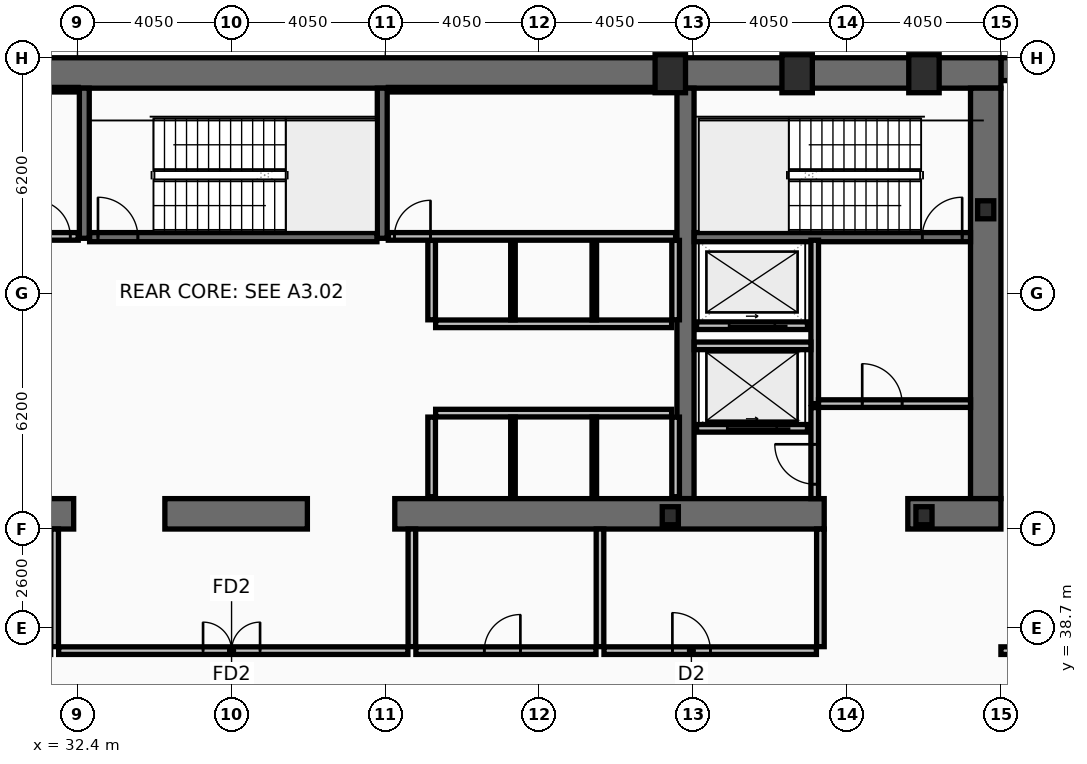
"""IFC4 building model, lengths in metres.
Left out: names, types, materials, properties, quantities, classifications, styles, units other than length and angle.
Written with IfcOpenShell. Run it as: python <this file> out.ifc"""

import sys

from ifc_helpers import new_model, si_unit, direction, frame, frame_2d, origin, origin_2d, place, context, subcontext, project, spatial, rectangle, hollow_rectangle, i_section, extrude, element, fill, save


model = new_model("IFC4")
c1 = context("Model", 3, precision=1e-05, world=origin(), true_north=direction((0.0, 1.0)))
c2 = subcontext(c1, "Body", "Model", "MODEL_VIEW")
j1 = project(units=[si_unit("LENGTHUNIT", "METRE"), si_unit("PLANEANGLEUNIT", "RADIAN")], contexts=[c1])
p1 = place(None, origin())
s1 = spatial("IfcSite", under=j1, at=p1, CompositionType="ELEMENT")
p2 = place(p1, origin())
s2 = spatial("IfcBuilding", under=s1, at=p2, CompositionType="ELEMENT")
p3 = place(p2, frame((0.0, 0.0, -4.5)))
s3 = spatial("IfcBuildingStorey", under=s2, at=p3, CompositionType="ELEMENT", Elevation=-4.5)
p4 = place(p3, frame((56.7, 53.4, 0.0), z_axis=(0.0, 0.0, 1.0), x_axis=(1.0, 0.0, 0.0)))
e1 = element("IfcWall", 1, at=p4, inside=s3, PredefinedType="SOLIDWALL", context=c2, shape_type="SweptSolid", body=[
    extrude(rectangle(XDim=15.6, YDim=0.6, at=frame_2d((7.8, 0.0))), origin(), (0.0, 0.0, 1.0), 4.28),
])
p5 = place(p3, frame((16.2, 53.3, 0.0), z_axis=(0.0, 0.0, 1.0), x_axis=(1.0, 0.0, 0.0)))
e2 = element("IfcWall", 2, at=p5, inside=s3, PredefinedType="SHEAR", context=c2, shape_type="SweptSolid", body=[
    extrude(rectangle(XDim=40.5, YDim=0.8, at=frame_2d((20.25, 0.0))), origin(), (0.0, 0.0, 1.0), 4.28),
])
p6 = place(p3, frame((56.3, 52.9, 0.0), z_axis=(0.0, 0.0, 1.0), x_axis=(0.0, -1.0, 0.0)))
e3 = element("IfcWall", 3, at=p6, inside=s3, PredefinedType="SHEAR", context=c2, shape_type="SweptSolid", body=[
    extrude(rectangle(XDim=10.8, YDim=0.8, at=frame_2d((5.4, 0.0))), origin(), (0.0, 0.0, 1.0), 4.28),
])
p7 = place(p3, frame((48.4, 42.1, 0.0), z_axis=(0.0, 0.0, 1.0), x_axis=(0.0, 1.0, 0.0)))
e4 = element("IfcWall", 4, at=p7, inside=s3, PredefinedType="SHEAR", context=c2, shape_type="SweptSolid", body=[
    extrude(rectangle(XDim=10.8, YDim=0.45, at=frame_2d((5.4, 0.0))), origin(), (0.0, 0.0, 1.0), 4.28),
])
p8 = place(p3, frame((32.3, 41.7, 0.0), z_axis=(0.0, 0.0, 1.0), x_axis=(-1.0, 0.0, 0.0)))
e5 = element("IfcWall", 5, at=p8, inside=s3, PredefinedType="SHEAR", context=c2, shape_type="SweptSolid", body=[
    extrude(rectangle(XDim=11.45, YDim=0.8, at=frame_2d((5.725, 0.0))), origin(), (0.0, 0.0, 1.0), 4.28),
])
p9 = place(p3, frame((38.45, 41.7, 0.0), z_axis=(0.0, 0.0, 1.0), x_axis=(-1.0, 0.0, 0.0)))
e6 = element("IfcWall", 6, at=p9, inside=s3, PredefinedType="SHEAR", context=c2, shape_type="SweptSolid", body=[
    extrude(rectangle(XDim=3.75, YDim=0.8, at=frame_2d((1.875, 0.0))), origin(), (0.0, 0.0, 1.0), 4.28),
])
p10 = place(p3, frame((52.05, 41.7, 0.0), z_axis=(0.0, 0.0, 1.0), x_axis=(-1.0, 0.0, 0.0)))
e7 = element("IfcWall", 7, at=p10, inside=s3, PredefinedType="SHEAR", context=c2, shape_type="SweptSolid", body=[
    extrude(rectangle(XDim=11.3, YDim=0.8, at=frame_2d((5.65, 0.0))), origin(), (0.0, 0.0, 1.0), 4.28),
])
p11 = place(p3, frame((56.7, 41.7, 0.0), z_axis=(0.0, 0.0, 1.0), x_axis=(-1.0, 0.0, 0.0)))
e8 = element("IfcWall", 8, at=p11, inside=s3, PredefinedType="SHEAR", context=c2, shape_type="SweptSolid", body=[
    extrude(rectangle(XDim=2.45, YDim=0.8, at=frame_2d((1.225, 0.0))), origin(), (0.0, 0.0, 1.0), 4.28),
])
for number, where, z_axis, x_axis in (
    (9, (32.58, 48.95, 0.0), (0.0, 0.0, 1.0), (0.0, 1.0, 0.0)),
    (10, (40.42, 48.95, 0.0), (0.0, 0.0, 1.0), (0.0, 1.0, 0.0)),
):
    element("IfcWall", number, at=place(p3, frame(where, z_axis=z_axis, x_axis=x_axis)), inside=s3, PredefinedType="SHEAR", context=c2, shape_type="SweptSolid", body=[
        extrude(rectangle(XDim=3.95, YDim=0.26, at=frame_2d((1.975, 0.0))), origin(), (0.0, 0.0, 1.0), 4.28),
    ])
p12 = place(p3, frame((48.63, 48.98, 0.0), z_axis=(0.0, 0.0, 1.0), x_axis=(1.0, 0.0, 0.0)))
e11 = element("IfcWall", 11, at=p12, inside=s3, PredefinedType="SHEAR", context=c2, shape_type="SweptSolid", body=[
    extrude(rectangle(XDim=7.27, YDim=0.24, at=frame_2d((3.635, 0.0))), origin(), (0.0, 0.0, 1.0), 4.28),
])
p13 = place(p12, frame((6.0, 0.0, 0.0)))
e12 = element("IfcOpeningElement", 12, at=p13, cuts=e11, PredefinedType="OPENING", context=c2, shape_type="SweptSolid", body=[
    extrude(rectangle(XDim=1.05, YDim=2.15, at=frame_2d((0.525, 1.075))), frame((0.0, 0.13, 0.0), z_axis=(0.0, -1.0, 0.0), x_axis=(1.0, 0.0, 0.0)), (0.0, 0.0, 1.0), 0.26),
])
p14 = place(p3, frame((32.72, 48.98, 0.0), z_axis=(0.0, 0.0, 1.0), x_axis=(1.0, 0.0, 0.0)))
e13 = element("IfcWall", 13, at=p14, inside=s3, PredefinedType="SHEAR", context=c2, shape_type="SweptSolid", body=[
    extrude(rectangle(XDim=7.56, YDim=0.24, at=frame_2d((3.78, 0.0))), origin(), (0.0, 0.0, 1.0), 4.28),
])
p15 = place(p14, frame((0.22, 0.0, 0.0)))
e14 = element("IfcOpeningElement", 14, at=p15, cuts=e13, PredefinedType="OPENING", context=c2, shape_type="SweptSolid", body=[
    extrude(rectangle(XDim=1.05, YDim=2.15, at=frame_2d((0.525, 1.075))), frame((0.0, 0.13, 0.0), z_axis=(0.0, -1.0, 0.0), x_axis=(1.0, 0.0, 0.0)), (0.0, 0.0, 1.0), 0.26),
])
for number, where, z_axis, x_axis in (
    (15, (48.0, 53.28, 0.0), (0.0, 0.0, 1.0), (1.0, 0.0, 0.0)),
    (16, (51.337, 53.28, 0.0), (0.0, 0.0, 1.0), (1.0, 0.0, 0.0)),
    (17, (54.675, 53.28, 0.0), (0.0, 0.0, 1.0), (1.0, 0.0, 0.0)),
):
    element("IfcColumn", number, at=place(p3, frame(where, z_axis=z_axis, x_axis=x_axis)), inside=s3, PredefinedType="COLUMN", context=c2, shape_type="SweptSolid", body=[
        extrude(hollow_rectangle(XDim=0.8, YDim=1.0, WallThickness=0.055, at=origin_2d()), origin(), (0.0, 0.0, 1.0), 4.5),
    ])
for number, where, z_axis, x_axis in (
    (18, (56.3, 49.7, 0.0), (0.0, 0.0, 1.0), (1.0, 0.0, 0.0)),
    (19, (48.0, 41.65, 0.0), (0.0, 0.0, 1.0), (1.0, 0.0, 0.0)),
    (20, (54.675, 41.65, 0.0), (0.0, 0.0, 1.0), (1.0, 0.0, 0.0)),
):
    element("IfcColumn", number, at=place(p3, frame(where, z_axis=z_axis, x_axis=x_axis)), inside=s3, PredefinedType="COLUMN", context=c2, shape_type="SweptSolid", body=[
        extrude(i_section(OverallWidth=0.424, OverallDepth=0.474, WebThickness=0.048, FlangeThickness=0.077, at=origin_2d()), origin(), (0.0, 0.0, 1.0), 4.5),
    ])
p16 = place(p3, frame((51.61, 43.95, 0.0), z_axis=(0.0, 0.0, 1.0), x_axis=(-1.0, 0.0, 0.0)))
e21 = element("IfcWall", 21, at=p16, inside=s3, PredefinedType="PARTITIONING", context=c2, shape_type="SweptSolid", body=[
    extrude(rectangle(XDim=2.92, YDim=0.2, at=frame_2d((1.46, 0.0))), origin(), (0.0, 0.0, 1.0), 4.28),
])
p17 = place(p16, frame((0.81, 0.0, 0.0)))
e22 = element("IfcOpeningElement", 22, at=p17, cuts=e21, PredefinedType="OPENING", context=c2, shape_type="SweptSolid", body=[
    extrude(rectangle(XDim=1.3, YDim=2.18, at=frame_2d((0.65, 1.09))), frame((0.0, 0.11, 0.0), z_axis=(0.0, -1.0, 0.0), x_axis=(1.0, 0.0, 0.0)), (0.0, 0.0, 1.0), 0.22),
])
p18 = place(p3, frame((51.61, 46.65, 0.0), z_axis=(0.0, 0.0, 1.0), x_axis=(-1.0, 0.0, 0.0)))
e23 = element("IfcWall", 23, at=p18, inside=s3, PredefinedType="PARTITIONING", context=c2, shape_type="SweptSolid", body=[
    extrude(rectangle(XDim=2.92, YDim=0.2, at=frame_2d((1.46, 0.0))), origin(), (0.0, 0.0, 1.0), 4.28),
])
p19 = place(p18, frame((0.86, 0.0, 0.0)))
e24 = element("IfcOpeningElement", 24, at=p19, cuts=e23, PredefinedType="OPENING", context=c2, shape_type="SweptSolid", body=[
    extrude(rectangle(XDim=1.2, YDim=2.18, at=frame_2d((0.6, 1.09))), frame((0.0, 0.11, 0.0), z_axis=(0.0, -1.0, 0.0), x_axis=(1.0, 0.0, 0.0)), (0.0, 0.0, 1.0), 0.22),
])
p20 = place(p3, frame((51.8, 44.6, 0.0), z_axis=(0.0, 0.0, 1.0), x_axis=(0.0, 1.0, 0.0)))
e25 = element("IfcWall", 25, at=p20, inside=s3, PredefinedType="PARTITIONING", context=c2, shape_type="SweptSolid", body=[
    extrude(rectangle(XDim=4.3, YDim=0.2, at=frame_2d((2.15, 0.0))), origin(), (0.0, 0.0, 1.0), 4.28),
])
p21 = place(p3, frame((51.9, 44.6, 0.0), z_axis=(0.0, 0.0, 1.0), x_axis=(1.0, 0.0, 0.0)))
e26 = element("IfcWall", 26, at=p21, inside=s3, PredefinedType="PARTITIONING", context=c2, shape_type="SweptSolid", body=[
    extrude(rectangle(XDim=4.0, YDim=0.2, at=frame_2d((2.0, 0.0))), origin(), (0.0, 0.0, 1.0), 4.28),
])
p22 = place(p21, frame((1.15, 0.0, 0.0)))
e27 = element("IfcOpeningElement", 27, at=p22, cuts=e26, PredefinedType="OPENING", context=c2, shape_type="SweptSolid", body=[
    extrude(rectangle(XDim=1.05, YDim=2.15, at=frame_2d((0.525, 1.075))), frame((0.0, 0.11, 0.0), z_axis=(0.0, -1.0, 0.0), x_axis=(1.0, 0.0, 0.0)), (0.0, 0.0, 1.0), 0.22),
])
p23 = place(p3, frame((48.63, 46.12, 0.0), z_axis=(0.0, 0.0, 1.0), x_axis=(1.0, 0.0, 0.0)))
e28 = element("IfcWall", 28, at=p23, inside=s3, PredefinedType="PARTITIONING", context=c2, shape_type="SweptSolid", body=[
    extrude(rectangle(XDim=3.07, YDim=0.2, at=frame_2d((1.535, 0.0))), origin(), (0.0, 0.0, 1.0), 4.28),
])
p24 = place(p3, frame((51.8, 42.1, 0.0), z_axis=(0.0, 0.0, 1.0), x_axis=(0.0, 1.0, 0.0)))
e29 = element("IfcWall", 29, at=p24, inside=s3, PredefinedType="PARTITIONING", context=c2, shape_type="SweptSolid", body=[
    extrude(rectangle(XDim=2.395, YDim=0.2, at=frame_2d((1.198, 0.0))), origin(), (0.0, 0.0, 1.0), 4.28),
])
p25 = place(p24, frame((0.38, 0.0, 0.0)))
e30 = element("IfcOpeningElement", 30, at=p25, cuts=e29, PredefinedType="OPENING", context=c2, shape_type="SweptSolid", body=[
    extrude(rectangle(XDim=1.05, YDim=2.15, at=frame_2d((0.525, 1.075))), frame((0.0, 0.11, 0.0), z_axis=(0.0, -1.0, 0.0), x_axis=(1.0, 0.0, 0.0)), (0.0, 0.0, 1.0), 0.22),
])
p26 = place(p3, frame((41.825, 46.7, 0.0), z_axis=(0.0, 0.0, 1.0), x_axis=(1.0, 0.0, 0.0)))
e31 = element("IfcWall", 31, at=p26, inside=s3, PredefinedType="PARTITIONING", context=c2, shape_type="SweptSolid", body=[
    extrude(rectangle(XDim=6.21, YDim=0.2, at=frame_2d((3.105, 0.0))), origin(), (0.0, 0.0, 1.0), 4.28),
])
for number, where, z_axis, x_axis in (
    (32, (41.72, 46.805, 0.0), (0.0, 0.0, 1.0), (0.0, 1.0, 0.0)),
    (33, (48.14, 46.805, 0.0), (0.0, 0.0, 1.0), (0.0, 1.0, 0.0)),
):
    element("IfcWall", number, at=place(p3, frame(where, z_axis=z_axis, x_axis=x_axis)), inside=s3, PredefinedType="PARTITIONING", context=c2, shape_type="SweptSolid", body=[
        extrude(rectangle(XDim=2.09, YDim=0.2, at=frame_2d((1.045, 0.0))), origin(), (0.0, 0.0, 1.0), 4.28),
    ])
for number, where, z_axis, x_axis in (
    (34, (43.86, 46.805, 0.0), (0.0, 0.0, 1.0), (0.0, 1.0, 0.0)),
    (35, (46.0, 46.805, 0.0), (0.0, 0.0, 1.0), (0.0, 1.0, 0.0)),
):
    element("IfcWall", number, at=place(p3, frame(where, z_axis=z_axis, x_axis=x_axis)), inside=s3, PredefinedType="PARTITIONING", context=c2, shape_type="SweptSolid", body=[
        extrude(rectangle(XDim=2.09, YDim=0.12, at=frame_2d((1.045, 0.0))), origin(), (0.0, 0.0, 1.0), 4.28),
    ])
p27 = place(p3, frame((41.825, 44.35, 0.0), z_axis=(0.0, 0.0, 1.0), x_axis=(1.0, 0.0, 0.0)))
e36 = element("IfcWall", 36, at=p27, inside=s3, PredefinedType="PARTITIONING", context=c2, shape_type="SweptSolid", body=[
    extrude(rectangle(XDim=6.21, YDim=0.2, at=frame_2d((3.105, 0.0))), origin(), (0.0, 0.0, 1.0), 4.28),
])
for number, where, z_axis, x_axis in (
    (37, (41.72, 42.15, 0.0), (0.0, 0.0, 1.0), (0.0, 1.0, 0.0)),
    (38, (48.14, 42.15, 0.0), (0.0, 0.0, 1.0), (0.0, 1.0, 0.0)),
):
    element("IfcWall", number, at=place(p3, frame(where, z_axis=z_axis, x_axis=x_axis)), inside=s3, PredefinedType="PARTITIONING", context=c2, shape_type="SweptSolid", body=[
        extrude(rectangle(XDim=2.095, YDim=0.2, at=frame_2d((1.048, 0.0))), origin(), (0.0, 0.0, 1.0), 4.28),
    ])
for number, where, z_axis, x_axis in (
    (39, (43.86, 42.15, 0.0), (0.0, 0.0, 1.0), (0.0, 1.0, 0.0)),
    (40, (46.0, 42.15, 0.0), (0.0, 0.0, 1.0), (0.0, 1.0, 0.0)),
):
    element("IfcWall", number, at=place(p3, frame(where, z_axis=z_axis, x_axis=x_axis)), inside=s3, PredefinedType="PARTITIONING", context=c2, shape_type="SweptSolid", body=[
        extrude(rectangle(XDim=2.095, YDim=0.12, at=frame_2d((1.048, 0.0))), origin(), (0.0, 0.0, 1.0), 4.28),
    ])
p28 = place(p3, frame((24.7, 52.86, 0.0), z_axis=(0.0, 0.0, 1.0), x_axis=(1.0, 0.0, 0.0)))
e41 = element("IfcWall", 41, at=p28, inside=s3, PredefinedType="PARTITIONING", context=c2, shape_type="SweptSolid", body=[
    extrude(rectangle(XDim=7.72, YDim=0.12, at=frame_2d((3.86, 0.0))), origin(), (0.0, 0.0, 1.0), 4.28),
])
p29 = place(p3, frame((24.7, 49.0, 0.0), z_axis=(0.0, 0.0, 1.0), x_axis=(1.0, 0.0, 0.0)))
e42 = element("IfcWall", 42, at=p29, inside=s3, PredefinedType="PARTITIONING", context=c2, shape_type="SweptSolid", body=[
    extrude(rectangle(XDim=7.72, YDim=0.2, at=frame_2d((3.86, 0.0))), origin(), (0.0, 0.0, 1.0), 4.28),
])
p30 = place(p29, frame((6.56, 0.0, 0.0)))
e43 = element("IfcOpeningElement", 43, at=p30, cuts=e42, PredefinedType="OPENING", context=c2, shape_type="SweptSolid", body=[
    extrude(rectangle(XDim=0.95, YDim=2.1, at=frame_2d((0.475, 1.05))), frame((0.0, 0.11, 0.0), z_axis=(0.0, -1.0, 0.0), x_axis=(1.0, 0.0, 0.0)), (0.0, 0.0, 1.0), 0.22),
])
p31 = place(p3, frame((40.58, 52.86, 0.0), z_axis=(0.0, 0.0, 1.0), x_axis=(1.0, 0.0, 0.0)))
e44 = element("IfcWall", 44, at=p31, inside=s3, PredefinedType="PARTITIONING", context=c2, shape_type="SweptSolid", body=[
    extrude(rectangle(XDim=7.56, YDim=0.12, at=frame_2d((3.78, 0.0))), origin(), (0.0, 0.0, 1.0), 4.28),
])
p32 = place(p3, frame((40.58, 49.0, 0.0), z_axis=(0.0, 0.0, 1.0), x_axis=(1.0, 0.0, 0.0)))
e45 = element("IfcWall", 45, at=p32, inside=s3, PredefinedType="PARTITIONING", context=c2, shape_type="SweptSolid", body=[
    extrude(rectangle(XDim=7.56, YDim=0.2, at=frame_2d((3.78, 0.0))), origin(), (0.0, 0.0, 1.0), 4.28),
])
p33 = place(p32, frame((0.16, 0.0, 0.0)))
e46 = element("IfcOpeningElement", 46, at=p33, cuts=e45, PredefinedType="OPENING", context=c2, shape_type="SweptSolid", body=[
    extrude(rectangle(XDim=0.95, YDim=2.1, at=frame_2d((0.475, 1.05))), frame((0.0, 0.11, 0.0), z_axis=(0.0, -1.0, 0.0), x_axis=(1.0, 0.0, 0.0)), (0.0, 0.0, 1.0), 0.22),
])
p34 = place(p3, frame((31.905, 38.1, 0.0), z_axis=(0.0, 0.0, 1.0), x_axis=(1.0, 0.0, 0.0)))
e47 = element("IfcWall", 47, at=p34, inside=s3, PredefinedType="PARTITIONING", context=c2, shape_type="SweptSolid", body=[
    extrude(rectangle(XDim=9.19, YDim=0.2, at=frame_2d((4.595, 0.0))), origin(), (0.0, 0.0, 1.0), 4.28),
])
p35 = place(p34, frame((3.8, 0.0, 0.0)))
e48 = element("IfcOpeningElement", 48, at=p35, cuts=e47, PredefinedType="OPENING", context=c2, shape_type="SweptSolid", body=[
    extrude(rectangle(XDim=1.5, YDim=2.15, at=frame_2d((0.75, 1.075))), frame((0.0, 0.11, 0.0), z_axis=(0.0, -1.0, 0.0), x_axis=(1.0, 0.0, 0.0)), (0.0, 0.0, 1.0), 0.22),
])
for number, where, z_axis, x_axis in (
    (49, (31.8, 38.205, 0.0), (0.0, 0.0, 1.0), (0.0, 1.0, 0.0)),
    (50, (41.2, 38.205, 0.0), (0.0, 0.0, 1.0), (0.0, 1.0, 0.0)),
):
    element("IfcWall", number, at=place(p3, frame(where, z_axis=z_axis, x_axis=x_axis)), inside=s3, PredefinedType="PARTITIONING", context=c2, shape_type="SweptSolid", body=[
        extrude(rectangle(XDim=3.095, YDim=0.2, at=frame_2d((1.547, 0.0))), origin(), (0.0, 0.0, 1.0), 4.28),
    ])
p36 = place(p3, frame((56.7, 38.1, 0.0), z_axis=(0.0, 0.0, 1.0), x_axis=(1.0, 0.0, 0.0)))
e51 = element("IfcWall", 51, at=p36, inside=s3, PredefinedType="PARTITIONING", context=c2, shape_type="SweptSolid", body=[
    extrude(rectangle(XDim=15.6, YDim=0.2, at=frame_2d((7.8, 0.0))), origin(), (0.0, 0.0, 1.0), 3.59),
])
p37 = place(p36, frame((5.5, 0.0, 0.0)))
e52 = element("IfcOpeningElement", 52, at=p37, cuts=e51, PredefinedType="OPENING", context=c2, shape_type="SweptSolid", body=[
    extrude(rectangle(XDim=1.4, YDim=2.15, at=frame_2d((0.7, 1.075))), frame((0.0, 0.11, 0.0), z_axis=(0.0, -1.0, 0.0), x_axis=(1.0, 0.0, 0.0)), (0.0, 0.0, 1.0), 0.22),
])
for number, where, z_axis, x_axis in (
    (53, (46.15, 38.205, 0.0), (0.0, 0.0, 1.0), (0.0, 1.0, 0.0)),
    (54, (51.95, 38.205, 0.0), (0.0, 0.0, 1.0), (0.0, 1.0, 0.0)),
):
    element("IfcWall", number, at=place(p3, frame(where, z_axis=z_axis, x_axis=x_axis)), inside=s3, PredefinedType="PARTITIONING", context=c2, shape_type="SweptSolid", body=[
        extrude(rectangle(XDim=3.095, YDim=0.2, at=frame_2d((1.547, 0.0))), origin(), (0.0, 0.0, 1.0), 4.28),
    ])
p38 = place(p3, frame((41.305, 38.1, 0.0), z_axis=(0.0, 0.0, 1.0), x_axis=(1.0, 0.0, 0.0)))
e55 = element("IfcWall", 55, at=p38, inside=s3, PredefinedType="PARTITIONING", context=c2, shape_type="SweptSolid", body=[
    extrude(rectangle(XDim=4.74, YDim=0.2, at=frame_2d((2.37, 0.0))), origin(), (0.0, 0.0, 1.0), 3.37),
])
p39 = place(p38, frame((1.8, 0.0, 0.0)))
e56 = element("IfcOpeningElement", 56, at=p39, cuts=e55, PredefinedType="OPENING", context=c2, shape_type="SweptSolid", body=[
    extrude(rectangle(XDim=0.95, YDim=2.05, at=frame_2d((0.475, 1.025))), frame((0.0, 0.11, 0.0), z_axis=(0.0, -1.0, 0.0), x_axis=(1.0, 0.0, 0.0)), (0.0, 0.0, 1.0), 0.22),
])
p40 = place(p3, frame((46.255, 38.1, 0.0), z_axis=(0.0, 0.0, 1.0), x_axis=(1.0, 0.0, 0.0)))
e57 = element("IfcWall", 57, at=p40, inside=s3, PredefinedType="PARTITIONING", context=c2, shape_type="SweptSolid", body=[
    extrude(rectangle(XDim=5.59, YDim=0.2, at=frame_2d((2.795, 0.0))), origin(), (0.0, 0.0, 1.0), 3.37),
])
p41 = place(p40, frame((1.8, 0.0, 0.0)))
e58 = element("IfcOpeningElement", 58, at=p41, cuts=e57, PredefinedType="OPENING", context=c2, shape_type="SweptSolid", body=[
    extrude(rectangle(XDim=1.0, YDim=2.05, at=frame_2d((0.5, 1.025))), frame((0.0, 0.11, 0.0), z_axis=(0.0, -1.0, 0.0), x_axis=(1.0, 0.0, 0.0)), (0.0, 0.0, 1.0), 0.22),
])
p42 = place(p13, origin())
e59 = element("IfcDoor", 59, at=p42, inside=s3, OperationType="SINGLE_SWING_RIGHT", PredefinedType="DOOR", context=c2, shape_type="SweptSolid", body=[
    extrude(rectangle(XDim=1.05, YDim=2.15, at=frame_2d((0.525, 1.075))), frame((0.0, 0.025, 0.0), z_axis=(0.0, -1.0, 0.0), x_axis=(1.0, 0.0, 0.0)), (0.0, 0.0, 1.0), 0.05),
])
fill(e12, e59)
p43 = place(p15, origin())
e60 = element("IfcDoor", 60, at=p43, inside=s3, OperationType="SINGLE_SWING_LEFT", PredefinedType="DOOR", context=c2, shape_type="SweptSolid", body=[
    extrude(rectangle(XDim=1.05, YDim=2.15, at=frame_2d((0.525, 1.075))), frame((0.0, 0.025, 0.0), z_axis=(0.0, -1.0, 0.0), x_axis=(1.0, 0.0, 0.0)), (0.0, 0.0, 1.0), 0.05),
])
fill(e14, e60)
p44 = place(p17, origin())
e61 = element("IfcDoor", 61, at=p44, inside=s3, OperationType="SLIDING_TO_LEFT", PredefinedType="DOOR", context=c2, shape_type="SweptSolid", body=[
    extrude(rectangle(XDim=1.3, YDim=2.18, at=frame_2d((0.65, 1.09))), frame((0.0, 0.025, 0.0), z_axis=(0.0, -1.0, 0.0), x_axis=(1.0, 0.0, 0.0)), (0.0, 0.0, 1.0), 0.05),
])
fill(e22, e61)
p45 = place(p19, origin())
e62 = element("IfcDoor", 62, at=p45, inside=s3, OperationType="SLIDING_TO_LEFT", PredefinedType="DOOR", context=c2, shape_type="SweptSolid", body=[
    extrude(rectangle(XDim=1.2, YDim=2.18, at=frame_2d((0.6, 1.09))), frame((0.0, 0.025, 0.0), z_axis=(0.0, -1.0, 0.0), x_axis=(1.0, 0.0, 0.0)), (0.0, 0.0, 1.0), 0.05),
])
fill(e24, e62)
p46 = place(p22, origin())
e63 = element("IfcDoor", 63, at=p46, inside=s3, OperationType="SINGLE_SWING_LEFT", PredefinedType="DOOR", context=c2, shape_type="SweptSolid", body=[
    extrude(rectangle(XDim=1.05, YDim=2.15, at=frame_2d((0.525, 1.075))), frame((0.0, 0.025, 0.0), z_axis=(0.0, -1.0, 0.0), x_axis=(1.0, 0.0, 0.0)), (0.0, 0.0, 1.0), 0.05),
])
fill(e27, e63)
p47 = place(p25, origin())
e64 = element("IfcDoor", 64, at=p47, inside=s3, OperationType="SINGLE_SWING_RIGHT", PredefinedType="DOOR", context=c2, shape_type="SweptSolid", body=[
    extrude(rectangle(XDim=1.05, YDim=2.15, at=frame_2d((0.525, 1.075))), frame((0.0, 0.025, 0.0), z_axis=(0.0, -1.0, 0.0), x_axis=(1.0, 0.0, 0.0)), (0.0, 0.0, 1.0), 0.05),
])
fill(e30, e64)
p48 = place(p30, origin())
e65 = element("IfcDoor", 65, at=p48, inside=s3, OperationType="SINGLE_SWING_LEFT", PredefinedType="DOOR", context=c2, shape_type="SweptSolid", body=[
    extrude(rectangle(XDim=0.95, YDim=2.1, at=frame_2d((0.475, 1.05))), frame((0.0, 0.025, 0.0), z_axis=(0.0, -1.0, 0.0), x_axis=(1.0, 0.0, 0.0)), (0.0, 0.0, 1.0), 0.05),
])
fill(e43, e65)
p49 = place(p33, origin())
e66 = element("IfcDoor", 66, at=p49, inside=s3, OperationType="SINGLE_SWING_RIGHT", PredefinedType="DOOR", context=c2, shape_type="SweptSolid", body=[
    extrude(rectangle(XDim=0.95, YDim=2.1, at=frame_2d((0.475, 1.05))), frame((0.0, 0.025, 0.0), z_axis=(0.0, -1.0, 0.0), x_axis=(1.0, 0.0, 0.0)), (0.0, 0.0, 1.0), 0.05),
])
fill(e46, e66)
p50 = place(p35, origin())
e67 = element("IfcDoor", 67, at=p50, inside=s3, OperationType="DOUBLE_DOOR_SINGLE_SWING", PredefinedType="DOOR", context=c2, shape_type="SweptSolid", body=[
    extrude(rectangle(XDim=1.5, YDim=2.15, at=frame_2d((0.75, 1.075))), frame((0.0, 0.025, 0.0), z_axis=(0.0, -1.0, 0.0), x_axis=(1.0, 0.0, 0.0)), (0.0, 0.0, 1.0), 0.05),
])
fill(e48, e67)
p51 = place(p39, origin())
e68 = element("IfcDoor", 68, at=p51, inside=s3, OperationType="SINGLE_SWING_RIGHT", PredefinedType="DOOR", context=c2, shape_type="SweptSolid", body=[
    extrude(rectangle(XDim=0.95, YDim=2.05, at=frame_2d((0.475, 1.025))), frame((0.0, 0.025, 0.0), z_axis=(0.0, -1.0, 0.0), x_axis=(1.0, 0.0, 0.0)), (0.0, 0.0, 1.0), 0.05),
])
fill(e56, e68)
p52 = place(p41, origin())
e69 = element("IfcDoor", 69, at=p52, inside=s3, OperationType="SINGLE_SWING_LEFT", PredefinedType="DOOR", context=c2, shape_type="SweptSolid", body=[
    extrude(rectangle(XDim=1.0, YDim=2.05, at=frame_2d((0.5, 1.025))), frame((0.0, 0.025, 0.0), z_axis=(0.0, -1.0, 0.0), x_axis=(1.0, 0.0, 0.0)), (0.0, 0.0, 1.0), 0.05),
])
fill(e58, e69)
save(model, sys.argv[1])
